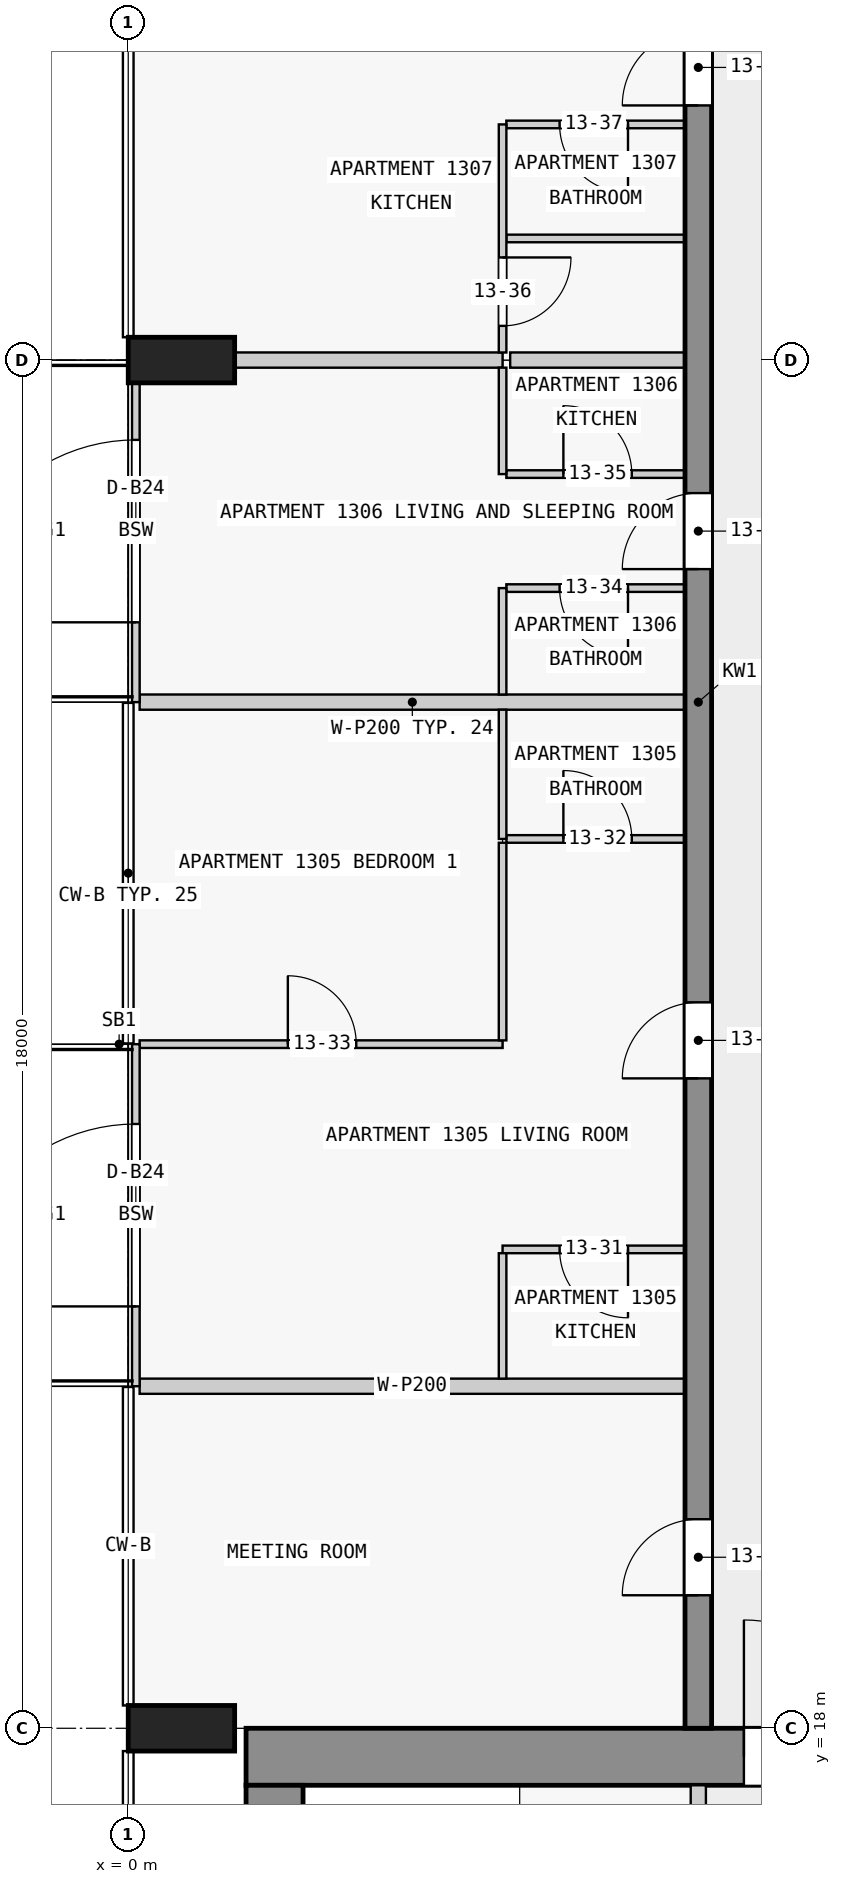
"""IFC4 building model, lengths in metres.
Left out: names, types, materials, properties, quantities, classifications, styles, units other than length and angle.
Written with IfcOpenShell. Run it as: python <this file> out.ifc"""

import sys

from ifc_helpers import new_model, si_unit, direction, frame, frame_2d, origin, origin_2d, place, context, subcontext, project, spatial, rectangle, extrude, element, fill, save


model = new_model("IFC4")
c1 = context("Model", 3, precision=1e-05, world=origin(), true_north=direction((0.0, 1.0)))
c2 = subcontext(c1, "Body", "Model", "MODEL_VIEW")
j1 = project(units=[si_unit("LENGTHUNIT", "METRE"), si_unit("PLANEANGLEUNIT", "RADIAN")], contexts=[c1])
p1 = place(None, origin())
s1 = spatial("IfcSite", under=j1, at=p1, CompositionType="ELEMENT")
p2 = place(p1, origin())
s2 = spatial("IfcBuilding", under=s1, at=p2, CompositionType="ELEMENT")
p3 = place(p2, frame((0.0, 0.0, 54.8)))
s3 = spatial("IfcBuildingStorey", under=s2, at=p3, CompositionType="ELEMENT", Elevation=54.8)
for number, where, z_axis, x_axis in (
    (1, (0.7, 36.0, 0.0), (0.0, 0.0, 1.0), (0.0, 1.0, 0.0)),
    (2, (0.7, 18.0, 0.0), (0.0, 0.0, 1.0), (0.0, 1.0, 0.0)),
):
    element("IfcColumn", number, at=place(p3, frame(where, z_axis=z_axis, x_axis=x_axis)), inside=s3, PredefinedType="COLUMN", context=c2, shape_type="SweptSolid", body=[
        extrude(rectangle(XDim=0.6, YDim=1.4, at=origin_2d()), origin(), (0.0, 0.0, 1.0), 3.5),
    ])
p4 = place(p3, frame((1.55, 17.625, 0.0), z_axis=(0.0, 0.0, 1.0), x_axis=(1.0, 0.0, 0.0)))
e3 = element("IfcWall", 3, at=p4, inside=s3, PredefinedType="SHEAR", context=c2, shape_type="SweptSolid", body=[
    extrude(rectangle(XDim=20.95, YDim=0.75, at=frame_2d((10.475, 0.0))), origin(), (0.0, 0.0, 1.0), 3.25),
])
p5 = place(p4, frame((6.55, 0.0, 0.0)))
e4 = element("IfcOpeningElement", 4, at=p5, cuts=e3, PredefinedType="OPENING", context=c2, shape_type="SweptSolid", body=[
    extrude(rectangle(XDim=1.8, YDim=2.1, at=frame_2d((0.9, 1.05))), frame((0.0, 0.385, 0.0), z_axis=(0.0, -1.0, 0.0), x_axis=(1.0, 0.0, 0.0)), (0.0, 0.0, 1.0), 0.77),
])
p6 = place(p3, frame((1.925, 2.5, 0.0), z_axis=(0.0, 0.0, 1.0), x_axis=(0.0, 1.0, 0.0)))
e5 = element("IfcWall", 5, at=p6, inside=s3, PredefinedType="SHEAR", context=c2, shape_type="SweptSolid", body=[
    extrude(rectangle(XDim=14.75, YDim=0.75, at=frame_2d((7.375, 0.0))), origin(), (0.0, 0.0, 1.0), 3.25),
])
p7 = place(p3, frame((7.5, 18.0, 0.0), z_axis=(0.0, 0.0, 1.0), x_axis=(0.0, 1.0, 0.0)))
e6 = element("IfcWall", 6, at=p7, inside=s3, PredefinedType="SHEAR", context=c2, shape_type="SweptSolid", body=[
    extrude(rectangle(XDim=27.0, YDim=0.35, at=frame_2d((13.5, 0.0))), origin(), (0.0, 0.0, 1.0), 3.25),
])
p8 = place(p7, frame((1.75, 0.0, 0.0)))
e7 = element("IfcOpeningElement", 7, at=p8, cuts=e6, PredefinedType="OPENING", context=c2, shape_type="SweptSolid", body=[
    extrude(rectangle(XDim=1.0, YDim=2.1, at=frame_2d((0.5, 1.05))), frame((0.0, 0.185, 0.0), z_axis=(0.0, -1.0, 0.0), x_axis=(1.0, 0.0, 0.0)), (0.0, 0.0, 1.0), 0.37),
])
p9 = place(p7, frame((8.55, 0.0, 0.0)))
e8 = element("IfcOpeningElement", 8, at=p9, cuts=e6, PredefinedType="OPENING", context=c2, shape_type="SweptSolid", body=[
    extrude(rectangle(XDim=1.0, YDim=2.1, at=frame_2d((0.5, 1.05))), frame((0.0, 0.185, 0.0), z_axis=(0.0, -1.0, 0.0), x_axis=(1.0, 0.0, 0.0)), (0.0, 0.0, 1.0), 0.37),
])
p10 = place(p7, frame((15.25, 0.0, 0.0)))
e9 = element("IfcOpeningElement", 9, at=p10, cuts=e6, PredefinedType="OPENING", context=c2, shape_type="SweptSolid", body=[
    extrude(rectangle(XDim=1.0, YDim=2.1, at=frame_2d((0.5, 1.05))), frame((0.0, 0.185, 0.0), z_axis=(0.0, -1.0, 0.0), x_axis=(1.0, 0.0, 0.0)), (0.0, 0.0, 1.0), 0.37),
])
p11 = place(p7, frame((21.35, 0.0, 0.0)))
e10 = element("IfcOpeningElement", 10, at=p11, cuts=e6, PredefinedType="OPENING", context=c2, shape_type="SweptSolid", body=[
    extrude(rectangle(XDim=1.0, YDim=2.1, at=frame_2d((0.5, 1.05))), frame((0.0, 0.185, 0.0), z_axis=(0.0, -1.0, 0.0), x_axis=(1.0, 0.0, 0.0)), (0.0, 0.0, 1.0), 0.37),
])
p12 = place(p3, frame((0.1, 22.5, 0.0), z_axis=(0.0, 0.0, 1.0), x_axis=(0.0, 1.0, 0.0)))
e11 = element("IfcWall", 11, at=p12, inside=s3, PredefinedType="STANDARD", context=c2, shape_type="SweptSolid", body=[
    extrude(rectangle(XDim=4.5, YDim=0.1, at=frame_2d((2.25, 0.0))), origin(), (0.0, 0.0, 1.0), 3.25),
])
p13 = place(p12, frame((1.05, 0.0, 0.0)))
e12 = element("IfcOpeningElement", 12, at=p13, cuts=e11, PredefinedType="OPENING", context=c2, shape_type="SweptSolid", body=[
    extrude(rectangle(XDim=2.4, YDim=2.4, at=frame_2d((1.2, 1.2))), frame((0.0, 0.06, 0.0), z_axis=(0.0, -1.0, 0.0), x_axis=(1.0, 0.0, 0.0)), (0.0, 0.0, 1.0), 0.12),
])
p14 = place(p3, frame((0.1, 31.5, 0.0), z_axis=(0.0, 0.0, 1.0), x_axis=(0.0, 1.0, 0.0)))
e13 = element("IfcWall", 13, at=p14, inside=s3, PredefinedType="STANDARD", context=c2, shape_type="SweptSolid", body=[
    extrude(rectangle(XDim=4.5, YDim=0.1, at=frame_2d((2.25, 0.0))), origin(), (0.0, 0.0, 1.0), 3.25),
])
p15 = place(p14, frame((1.05, 0.0, 0.0)))
e14 = element("IfcOpeningElement", 14, at=p15, cuts=e13, PredefinedType="OPENING", context=c2, shape_type="SweptSolid", body=[
    extrude(rectangle(XDim=2.4, YDim=2.4, at=frame_2d((1.2, 1.2))), frame((0.0, 0.06, 0.0), z_axis=(0.0, -1.0, 0.0), x_axis=(1.0, 0.0, 0.0)), (0.0, 0.0, 1.0), 0.12),
])
p16 = place(p3, frame((7.5, 10.1, 0.0), z_axis=(0.0, 0.0, 1.0), x_axis=(0.0, 1.0, 0.0)))
e15 = element("IfcWall", 15, at=p16, inside=s3, PredefinedType="PARTITIONING", context=c2, shape_type="SweptSolid", body=[
    extrude(rectangle(XDim=7.15, YDim=0.2, at=frame_2d((3.575, 0.0))), origin(), (0.0, 0.0, 1.0), 3.25),
])
p17 = place(p16, frame((1.5, 0.0, 0.0)))
e16 = element("IfcOpeningElement", 16, at=p17, cuts=e15, PredefinedType="OPENING", context=c2, shape_type="SweptSolid", body=[
    extrude(rectangle(XDim=0.9, YDim=2.1, at=frame_2d((0.45, 1.05))), frame((0.0, 0.11, 0.0), z_axis=(0.0, -1.0, 0.0), x_axis=(1.0, 0.0, 0.0)), (0.0, 0.0, 1.0), 0.22),
])
p18 = place(p16, frame((5.075, 0.0, 0.0)))
e17 = element("IfcOpeningElement", 17, at=p18, cuts=e15, PredefinedType="OPENING", context=c2, shape_type="SweptSolid", body=[
    extrude(rectangle(XDim=0.9, YDim=2.1, at=frame_2d((0.45, 1.05))), frame((0.0, 0.11, 0.0), z_axis=(0.0, -1.0, 0.0), x_axis=(1.0, 0.0, 0.0)), (0.0, 0.0, 1.0), 0.22),
])
p19 = place(p3, frame((7.325, 22.5, 0.0), z_axis=(0.0, 0.0, 1.0), x_axis=(-1.0, 0.0, 0.0)))
e18 = element("IfcWall", 18, at=p19, inside=s3, PredefinedType="PARTITIONING", context=c2, shape_type="SweptSolid", body=[
    extrude(rectangle(XDim=7.175, YDim=0.2, at=frame_2d((3.587, 0.0))), origin(), (0.0, 0.0, 1.0), 3.25),
])
p20 = place(p3, frame((7.325, 24.3, 0.0), z_axis=(0.0, 0.0, 1.0), x_axis=(-1.0, 0.0, 0.0)))
e19 = element("IfcWall", 19, at=p20, inside=s3, PredefinedType="PARTITIONING", context=c2, shape_type="SweptSolid", body=[
    extrude(rectangle(XDim=2.4, YDim=0.1, at=frame_2d((1.2, 0.0))), origin(), (0.0, 0.0, 1.0), 3.25),
])
p21 = place(p20, frame((0.75, 0.0, 0.0)))
e20 = element("IfcOpeningElement", 20, at=p21, cuts=e19, PredefinedType="OPENING", context=c2, shape_type="SweptSolid", body=[
    extrude(rectangle(XDim=0.9, YDim=2.1, at=frame_2d((0.45, 1.05))), frame((0.0, 0.06, 0.0), z_axis=(0.0, -1.0, 0.0), x_axis=(1.0, 0.0, 0.0)), (0.0, 0.0, 1.0), 0.12),
])
p22 = place(p3, frame((0.15, 27.0, 0.0), z_axis=(0.0, 0.0, 1.0), x_axis=(1.0, 0.0, 0.0)))
e21 = element("IfcWall", 21, at=p22, inside=s3, PredefinedType="PARTITIONING", context=c2, shape_type="SweptSolid", body=[
    extrude(rectangle(XDim=4.775, YDim=0.1, at=frame_2d((2.388, 0.0))), origin(), (0.0, 0.0, 1.0), 3.25),
])
p23 = place(p22, frame((1.95, 0.0, 0.0)))
e22 = element("IfcOpeningElement", 22, at=p23, cuts=e21, PredefinedType="OPENING", context=c2, shape_type="SweptSolid", body=[
    extrude(rectangle(XDim=0.9, YDim=2.1, at=frame_2d((0.45, 1.05))), frame((0.0, 0.06, 0.0), z_axis=(0.0, -1.0, 0.0), x_axis=(1.0, 0.0, 0.0)), (0.0, 0.0, 1.0), 0.12),
])
p24 = place(p3, frame((4.975, 29.7, 0.0), z_axis=(0.0, 0.0, 1.0), x_axis=(1.0, 0.0, 0.0)))
e23 = element("IfcWall", 23, at=p24, inside=s3, PredefinedType="PARTITIONING", context=c2, shape_type="SweptSolid", body=[
    extrude(rectangle(XDim=2.35, YDim=0.1, at=frame_2d((1.175, 0.0))), origin(), (0.0, 0.0, 1.0), 3.25),
])
p25 = place(p24, frame((0.75, 0.0, 0.0)))
e24 = element("IfcOpeningElement", 24, at=p25, cuts=e23, PredefinedType="OPENING", context=c2, shape_type="SweptSolid", body=[
    extrude(rectangle(XDim=0.9, YDim=2.1, at=frame_2d((0.45, 1.05))), frame((0.0, 0.06, 0.0), z_axis=(0.0, -1.0, 0.0), x_axis=(1.0, 0.0, 0.0)), (0.0, 0.0, 1.0), 0.12),
])
p26 = place(p3, frame((7.325, 31.5, 0.0), z_axis=(0.0, 0.0, 1.0), x_axis=(-1.0, 0.0, 0.0)))
e25 = element("IfcWall", 25, at=p26, inside=s3, PredefinedType="PARTITIONING", context=c2, shape_type="SweptSolid", body=[
    extrude(rectangle(XDim=7.175, YDim=0.2, at=frame_2d((3.587, 0.0))), origin(), (0.0, 0.0, 1.0), 3.25),
])
p27 = place(p3, frame((7.325, 33.0, 0.0), z_axis=(0.0, 0.0, 1.0), x_axis=(-1.0, 0.0, 0.0)))
e26 = element("IfcWall", 26, at=p27, inside=s3, PredefinedType="PARTITIONING", context=c2, shape_type="SweptSolid", body=[
    extrude(rectangle(XDim=2.35, YDim=0.1, at=frame_2d((1.175, 0.0))), origin(), (0.0, 0.0, 1.0), 3.25),
])
p28 = place(p27, frame((0.75, 0.0, 0.0)))
e27 = element("IfcOpeningElement", 27, at=p28, cuts=e26, PredefinedType="OPENING", context=c2, shape_type="SweptSolid", body=[
    extrude(rectangle(XDim=0.9, YDim=2.1, at=frame_2d((0.45, 1.05))), frame((0.0, 0.06, 0.0), z_axis=(0.0, -1.0, 0.0), x_axis=(1.0, 0.0, 0.0)), (0.0, 0.0, 1.0), 0.12),
])
p29 = place(p3, frame((4.975, 34.5, 0.0), z_axis=(0.0, 0.0, 1.0), x_axis=(1.0, 0.0, 0.0)))
e28 = element("IfcWall", 28, at=p29, inside=s3, PredefinedType="PARTITIONING", context=c2, shape_type="SweptSolid", body=[
    extrude(rectangle(XDim=2.35, YDim=0.1, at=frame_2d((1.175, 0.0))), origin(), (0.0, 0.0, 1.0), 3.25),
])
p30 = place(p29, frame((0.75, 0.0, 0.0)))
e29 = element("IfcOpeningElement", 29, at=p30, cuts=e28, PredefinedType="OPENING", context=c2, shape_type="SweptSolid", body=[
    extrude(rectangle(XDim=0.9, YDim=2.1, at=frame_2d((0.45, 1.05))), frame((0.0, 0.06, 0.0), z_axis=(0.0, -1.0, 0.0), x_axis=(1.0, 0.0, 0.0)), (0.0, 0.0, 1.0), 0.12),
])
p31 = place(p3, frame((7.325, 36.0, 0.0), z_axis=(0.0, 0.0, 1.0), x_axis=(-1.0, 0.0, 0.0)))
e30 = element("IfcWall", 30, at=p31, inside=s3, PredefinedType="PARTITIONING", context=c2, shape_type="SweptSolid", body=[
    extrude(rectangle(XDim=2.3, YDim=0.2, at=frame_2d((1.15, 0.0))), origin(), (0.0, 0.0, 1.0), 3.25),
])
p32 = place(p3, frame((1.4, 36.0, 0.0), z_axis=(0.0, 0.0, 1.0), x_axis=(1.0, 0.0, 0.0)))
e31 = element("IfcWall", 31, at=p32, inside=s3, PredefinedType="PARTITIONING", context=c2, shape_type="SweptSolid", body=[
    extrude(rectangle(XDim=3.525, YDim=0.2, at=frame_2d((1.763, 0.0))), origin(), (0.0, 0.0, 1.0), 3.25),
])
p33 = place(p3, frame((7.325, 37.6, 0.0), z_axis=(0.0, 0.0, 1.0), x_axis=(-1.0, 0.0, 0.0)))
e32 = element("IfcWall", 32, at=p33, inside=s3, PredefinedType="PARTITIONING", context=c2, shape_type="SweptSolid", body=[
    extrude(rectangle(XDim=2.35, YDim=0.1, at=frame_2d((1.175, 0.0))), origin(), (0.0, 0.0, 1.0), 3.25),
])
p34 = place(p3, frame((7.325, 39.1, 0.0), z_axis=(0.0, 0.0, 1.0), x_axis=(-1.0, 0.0, 0.0)))
e33 = element("IfcWall", 33, at=p34, inside=s3, PredefinedType="PARTITIONING", context=c2, shape_type="SweptSolid", body=[
    extrude(rectangle(XDim=2.35, YDim=0.1, at=frame_2d((1.175, 0.0))), origin(), (0.0, 0.0, 1.0), 3.25),
])
p35 = place(p34, frame((0.75, 0.0, 0.0)))
e34 = element("IfcOpeningElement", 34, at=p35, cuts=e33, PredefinedType="OPENING", context=c2, shape_type="SweptSolid", body=[
    extrude(rectangle(XDim=0.9, YDim=2.1, at=frame_2d((0.45, 1.05))), frame((0.0, 0.06, 0.0), z_axis=(0.0, -1.0, 0.0), x_axis=(1.0, 0.0, 0.0)), (0.0, 0.0, 1.0), 0.12),
])
p36 = place(p3, frame((4.925, 24.25, 0.0), z_axis=(0.0, 0.0, 1.0), x_axis=(0.0, -1.0, 0.0)))
e35 = element("IfcWall", 35, at=p36, inside=s3, PredefinedType="PARTITIONING", context=c2, shape_type="SweptSolid", body=[
    extrude(rectangle(XDim=1.65, YDim=0.1, at=frame_2d((0.825, 0.0))), origin(), (0.0, 0.0, 1.0), 3.25),
])
p37 = place(p3, frame((4.925, 31.4, 0.0), z_axis=(0.0, 0.0, 1.0), x_axis=(0.0, -1.0, 0.0)))
e36 = element("IfcWall", 36, at=p37, inside=s3, PredefinedType="PARTITIONING", context=c2, shape_type="SweptSolid", body=[
    extrude(rectangle(XDim=1.7, YDim=0.1, at=frame_2d((0.85, 0.0))), origin(), (0.0, 0.0, 1.0), 3.25),
])
for number, where, z_axis, x_axis in (
    (37, (4.925, 33.0, 0.0), (0.0, 0.0, 1.0), (0.0, -1.0, 0.0)),
    (38, (4.925, 35.9, 0.0), (0.0, 0.0, 1.0), (0.0, -1.0, 0.0)),
):
    element("IfcWall", number, at=place(p3, frame(where, z_axis=z_axis, x_axis=x_axis)), inside=s3, PredefinedType="PARTITIONING", context=c2, shape_type="SweptSolid", body=[
        extrude(rectangle(XDim=1.4, YDim=0.1, at=frame_2d((0.7, 0.0))), origin(), (0.0, 0.0, 1.0), 3.25),
    ])
p38 = place(p3, frame((4.925, 39.1, 0.0), z_axis=(0.0, 0.0, 1.0), x_axis=(0.0, -1.0, 0.0)))
e39 = element("IfcWall", 39, at=p38, inside=s3, PredefinedType="PARTITIONING", context=c2, shape_type="SweptSolid", body=[
    extrude(rectangle(XDim=3.0, YDim=0.1, at=frame_2d((1.5, 0.0))), origin(), (0.0, 0.0, 1.0), 3.25),
])
p39 = place(p38, frame((1.75, 0.0, 0.0)))
e40 = element("IfcOpeningElement", 40, at=p39, cuts=e39, PredefinedType="OPENING", context=c2, shape_type="SweptSolid", body=[
    extrude(rectangle(XDim=0.9, YDim=2.1, at=frame_2d((0.45, 1.05))), frame((0.0, 0.06, 0.0), z_axis=(0.0, -1.0, 0.0), x_axis=(1.0, 0.0, 0.0)), (0.0, 0.0, 1.0), 0.12),
])
p40 = place(p3, frame((4.925, 27.05, 0.0), z_axis=(0.0, 0.0, 1.0), x_axis=(0.0, 1.0, 0.0)))
e41 = element("IfcWall", 41, at=p40, inside=s3, PredefinedType="PARTITIONING", context=c2, shape_type="SweptSolid", body=[
    extrude(rectangle(XDim=2.6, YDim=0.1, at=frame_2d((1.3, 0.0))), origin(), (0.0, 0.0, 1.0), 3.25),
])
p41 = place(p13, origin())
e42 = element("IfcDoor", 42, at=p41, inside=s3, OperationType="SINGLE_SWING_LEFT", PredefinedType="DOOR", context=c2, shape_type="SweptSolid", body=[
    extrude(rectangle(XDim=2.4, YDim=2.4, at=frame_2d((1.2, 1.2))), frame((0.0, 0.025, 0.0), z_axis=(0.0, -1.0, 0.0), x_axis=(1.0, 0.0, 0.0)), (0.0, 0.0, 1.0), 0.05),
])
fill(e12, e42)
p42 = place(p15, origin())
e43 = element("IfcDoor", 43, at=p42, inside=s3, OperationType="SINGLE_SWING_LEFT", PredefinedType="DOOR", context=c2, shape_type="SweptSolid", body=[
    extrude(rectangle(XDim=2.4, YDim=2.4, at=frame_2d((1.2, 1.2))), frame((0.0, 0.025, 0.0), z_axis=(0.0, -1.0, 0.0), x_axis=(1.0, 0.0, 0.0)), (0.0, 0.0, 1.0), 0.05),
])
fill(e14, e43)
p43 = place(p5, origin())
e44 = element("IfcDoor", 44, at=p43, inside=s3, OperationType="DOUBLE_DOOR_SINGLE_SWING", PredefinedType="DOOR", context=c2, shape_type="SweptSolid", body=[
    extrude(rectangle(XDim=1.8, YDim=2.1, at=frame_2d((0.9, 1.05))), frame((0.0, 0.025, 0.0), z_axis=(0.0, -1.0, 0.0), x_axis=(1.0, 0.0, 0.0)), (0.0, 0.0, 1.0), 0.05),
])
fill(e4, e44)
p44 = place(p8, origin())
e45 = element("IfcDoor", 45, at=p44, inside=s3, OperationType="SINGLE_SWING_LEFT", PredefinedType="DOOR", context=c2, shape_type="SweptSolid", body=[
    extrude(rectangle(XDim=1.0, YDim=2.1, at=frame_2d((0.5, 1.05))), frame((0.0, 0.025, 0.0), z_axis=(0.0, -1.0, 0.0), x_axis=(1.0, 0.0, 0.0)), (0.0, 0.0, 1.0), 0.05),
])
fill(e7, e45)
p45 = place(p9, origin())
e46 = element("IfcDoor", 46, at=p45, inside=s3, OperationType="SINGLE_SWING_LEFT", PredefinedType="DOOR", context=c2, shape_type="SweptSolid", body=[
    extrude(rectangle(XDim=1.0, YDim=2.1, at=frame_2d((0.5, 1.05))), frame((0.0, 0.025, 0.0), z_axis=(0.0, -1.0, 0.0), x_axis=(1.0, 0.0, 0.0)), (0.0, 0.0, 1.0), 0.05),
])
fill(e8, e46)
p46 = place(p10, origin())
e47 = element("IfcDoor", 47, at=p46, inside=s3, OperationType="SINGLE_SWING_RIGHT", PredefinedType="DOOR", context=c2, shape_type="SweptSolid", body=[
    extrude(rectangle(XDim=1.0, YDim=2.1, at=frame_2d((0.5, 1.05))), frame((0.0, 0.025, 0.0), z_axis=(0.0, -1.0, 0.0), x_axis=(1.0, 0.0, 0.0)), (0.0, 0.0, 1.0), 0.05),
])
fill(e9, e47)
p47 = place(p11, origin())
e48 = element("IfcDoor", 48, at=p47, inside=s3, OperationType="SINGLE_SWING_RIGHT", PredefinedType="DOOR", context=c2, shape_type="SweptSolid", body=[
    extrude(rectangle(XDim=1.0, YDim=2.1, at=frame_2d((0.5, 1.05))), frame((0.0, 0.025, 0.0), z_axis=(0.0, -1.0, 0.0), x_axis=(1.0, 0.0, 0.0)), (0.0, 0.0, 1.0), 0.05),
])
fill(e10, e48)
p48 = place(p21, origin())
e49 = element("IfcDoor", 49, at=p48, inside=s3, OperationType="SINGLE_SWING_LEFT", PredefinedType="DOOR", context=c2, shape_type="SweptSolid", body=[
    extrude(rectangle(XDim=0.9, YDim=2.1, at=frame_2d((0.45, 1.05))), frame((0.0, 0.025, 0.0), z_axis=(0.0, -1.0, 0.0), x_axis=(1.0, 0.0, 0.0)), (0.0, 0.0, 1.0), 0.05),
])
fill(e20, e49)
p49 = place(p25, origin())
e50 = element("IfcDoor", 50, at=p49, inside=s3, OperationType="SINGLE_SWING_RIGHT", PredefinedType="DOOR", context=c2, shape_type="SweptSolid", body=[
    extrude(rectangle(XDim=0.9, YDim=2.1, at=frame_2d((0.45, 1.05))), frame((0.0, 0.025, 0.0), z_axis=(0.0, -1.0, 0.0), x_axis=(1.0, 0.0, 0.0)), (0.0, 0.0, 1.0), 0.05),
])
fill(e24, e50)
p50 = place(p23, origin())
e51 = element("IfcDoor", 51, at=p50, inside=s3, OperationType="SINGLE_SWING_RIGHT", PredefinedType="DOOR", context=c2, shape_type="SweptSolid", body=[
    extrude(rectangle(XDim=0.9, YDim=2.1, at=frame_2d((0.45, 1.05))), frame((0.0, 0.025, 0.0), z_axis=(0.0, -1.0, 0.0), x_axis=(1.0, 0.0, 0.0)), (0.0, 0.0, 1.0), 0.05),
])
fill(e22, e51)
p51 = place(p28, origin())
e52 = element("IfcDoor", 52, at=p51, inside=s3, OperationType="SINGLE_SWING_RIGHT", PredefinedType="DOOR", context=c2, shape_type="SweptSolid", body=[
    extrude(rectangle(XDim=0.9, YDim=2.1, at=frame_2d((0.45, 1.05))), frame((0.0, 0.025, 0.0), z_axis=(0.0, -1.0, 0.0), x_axis=(1.0, 0.0, 0.0)), (0.0, 0.0, 1.0), 0.05),
])
fill(e27, e52)
p52 = place(p30, origin())
e53 = element("IfcDoor", 53, at=p52, inside=s3, OperationType="SINGLE_SWING_RIGHT", PredefinedType="DOOR", context=c2, shape_type="SweptSolid", body=[
    extrude(rectangle(XDim=0.9, YDim=2.1, at=frame_2d((0.45, 1.05))), frame((0.0, 0.025, 0.0), z_axis=(0.0, -1.0, 0.0), x_axis=(1.0, 0.0, 0.0)), (0.0, 0.0, 1.0), 0.05),
])
fill(e29, e53)
p53 = place(p39, origin())
e54 = element("IfcDoor", 54, at=p53, inside=s3, OperationType="SINGLE_SWING_RIGHT", PredefinedType="DOOR", context=c2, shape_type="SweptSolid", body=[
    extrude(rectangle(XDim=0.9, YDim=2.1, at=frame_2d((0.45, 1.05))), frame((0.0, 0.025, 0.0), z_axis=(0.0, -1.0, 0.0), x_axis=(1.0, 0.0, 0.0)), (0.0, 0.0, 1.0), 0.05),
])
fill(e40, e54)
p54 = place(p35, origin())
e55 = element("IfcDoor", 55, at=p54, inside=s3, OperationType="SINGLE_SWING_RIGHT", PredefinedType="DOOR", context=c2, shape_type="SweptSolid", body=[
    extrude(rectangle(XDim=0.9, YDim=2.1, at=frame_2d((0.45, 1.05))), frame((0.0, 0.025, 0.0), z_axis=(0.0, -1.0, 0.0), x_axis=(1.0, 0.0, 0.0)), (0.0, 0.0, 1.0), 0.05),
])
fill(e34, e55)
save(model, sys.argv[1])
